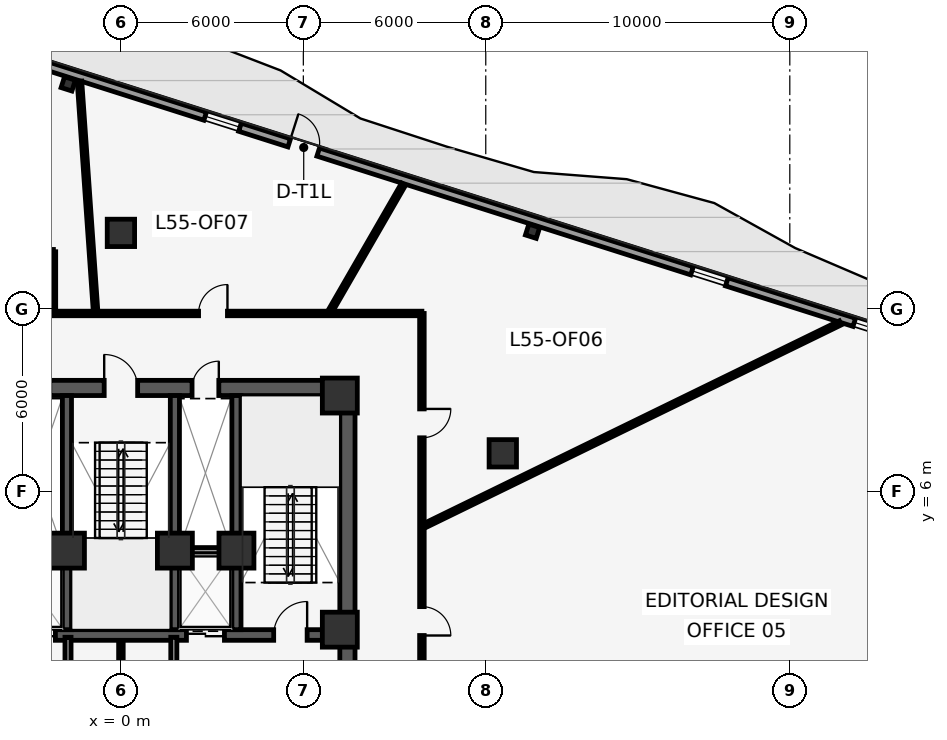
"""IFC4 building model, lengths in metres.
Left out: names, types, materials, properties, quantities, classifications, styles, units other than length and angle.
Written with IfcOpenShell. Run it as: python <this file> out.ifc"""

import sys

from ifc_helpers import new_model, si_unit, direction, frame, frame_2d, origin, origin_2d, place, context, subcontext, project, spatial, rectangle, i_section, extrude, element, fill, save


model = new_model("IFC4")
c1 = context("Model", 3, precision=1e-05, world=origin(), true_north=direction((0.0, 1.0)))
c2 = subcontext(c1, "Body", "Model", "MODEL_VIEW")
j1 = project(units=[si_unit("LENGTHUNIT", "METRE"), si_unit("PLANEANGLEUNIT", "RADIAN")], contexts=[c1])
p1 = place(None, origin())
s1 = spatial("IfcSite", under=j1, at=p1, CompositionType="ELEMENT")
p2 = place(p1, origin())
s2 = spatial("IfcBuilding", under=s1, at=p2, CompositionType="ELEMENT")
p3 = place(p2, frame((0.0, 0.0, 236.3)))
s3 = spatial("IfcBuildingStorey", under=s2, at=p3, CompositionType="ELEMENT", Elevation=236.3)
p4 = place(p3, frame((-7.45, 9.4, 0.0), z_axis=(0.0, 0.0, 1.0), x_axis=(1.0, 0.0, 0.0)))
e1 = element("IfcWall", 1, at=p4, inside=s3, PredefinedType="SHEAR", context=c2, shape_type="SweptSolid", body=[
    extrude(rectangle(XDim=14.9, YDim=0.5, at=frame_2d((7.45, 0.0))), origin(), (0.0, 0.0, 1.0), 3.85),
])
p5 = place(p4, frame((6.9, 0.0, 0.0)))
e2 = element("IfcOpeningElement", 2, at=p5, cuts=e1, PredefinedType="OPENING", context=c2, shape_type="SweptSolid", body=[
    extrude(rectangle(XDim=1.1, YDim=2.15, at=frame_2d((0.55, 1.075))), frame((0.0, 0.26, 0.0), z_axis=(0.0, -1.0, 0.0), x_axis=(1.0, 0.0, 0.0)), (0.0, 0.0, 1.0), 0.52),
])
p6 = place(p4, frame((4.23, 0.0, 0.0)))
e3 = element("IfcOpeningElement", 3, at=p6, cuts=e1, PredefinedType="OPENING", context=c2, shape_type="SweptSolid", body=[
    extrude(rectangle(XDim=0.88, YDim=2.15, at=frame_2d((0.44, 1.075))), frame((0.0, 0.26, 0.0), z_axis=(0.0, -1.0, 0.0), x_axis=(1.0, 0.0, 0.0)), (0.0, 0.0, 1.0), 0.52),
])
p7 = place(p4, frame((9.79, 0.0, 0.0)))
e4 = element("IfcOpeningElement", 4, at=p7, cuts=e1, PredefinedType="OPENING", context=c2, shape_type="SweptSolid", body=[
    extrude(rectangle(XDim=0.88, YDim=2.15, at=frame_2d((0.44, 1.075))), frame((0.0, 0.26, 0.0), z_axis=(0.0, -1.0, 0.0), x_axis=(1.0, 0.0, 0.0)), (0.0, 0.0, 1.0), 0.52),
])
p8 = place(p3, frame((-7.2, 1.275, 0.0), z_axis=(0.0, 0.0, 1.0), x_axis=(1.0, 0.0, 0.0)))
e5 = element("IfcWall", 5, at=p8, inside=s3, PredefinedType="SHEAR", context=c2, shape_type="SweptSolid", body=[
    extrude(rectangle(XDim=14.4, YDim=0.35, at=frame_2d((7.2, 0.0))), origin(), (0.0, 0.0, 1.0), 3.85),
])
p9 = place(p8, frame((3.795, 0.0, 0.0)))
e6 = element("IfcOpeningElement", 6, at=p9, cuts=e5, PredefinedType="OPENING", context=c2, shape_type="SweptSolid", body=[
    extrude(rectangle(XDim=1.25, YDim=2.25, at=frame_2d((0.625, 1.125))), frame((0.0, 0.185, 0.0), z_axis=(0.0, -1.0, 0.0), x_axis=(1.0, 0.0, 0.0)), (0.0, 0.0, 1.0), 0.37),
])
p10 = place(p8, frame((9.355, 0.0, 0.0)))
e7 = element("IfcOpeningElement", 7, at=p10, cuts=e5, PredefinedType="OPENING", context=c2, shape_type="SweptSolid", body=[
    extrude(rectangle(XDim=1.25, YDim=2.25, at=frame_2d((0.625, 1.125))), frame((0.0, 0.185, 0.0), z_axis=(0.0, -1.0, 0.0), x_axis=(1.0, 0.0, 0.0)), (0.0, 0.0, 1.0), 0.37),
])
p11 = place(p8, frame((1.075, 0.0, 0.0)))
e8 = element("IfcOpeningElement", 8, at=p11, cuts=e5, PredefinedType="OPENING", context=c2, shape_type="SweptSolid", body=[
    extrude(rectangle(XDim=1.1, YDim=2.15, at=frame_2d((0.55, 1.075))), frame((0.0, 0.185, 0.0), z_axis=(0.0, -1.0, 0.0), x_axis=(1.0, 0.0, 0.0)), (0.0, 0.0, 1.0), 0.37),
])
p12 = place(p8, frame((12.225, 0.0, 0.0)))
e9 = element("IfcOpeningElement", 9, at=p12, cuts=e5, PredefinedType="OPENING", context=c2, shape_type="SweptSolid", body=[
    extrude(rectangle(XDim=1.1, YDim=2.15, at=frame_2d((0.55, 1.075))), frame((0.0, 0.185, 0.0), z_axis=(0.0, -1.0, 0.0), x_axis=(1.0, 0.0, 0.0)), (0.0, 0.0, 1.0), 0.37),
])
for number, where, z_axis, x_axis in (
    (10, (-1.775, 1.45, 0.0), (0.0, 0.0, 1.0), (0.0, 1.0, 0.0)),
    (11, (1.775, 1.45, 0.0), (0.0, 0.0, 1.0), (0.0, 1.0, 0.0)),
    (12, (3.8, 1.45, 0.0), (0.0, 0.0, 1.0), (0.0, 1.0, 0.0)),
):
    element("IfcWall", number, at=place(p3, frame(where, z_axis=z_axis, x_axis=x_axis)), inside=s3, PredefinedType="SHEAR", context=c2, shape_type="SweptSolid", body=[
        extrude(rectangle(XDim=7.7, YDim=0.3, at=frame_2d((3.85, 0.0))), origin(), (0.0, 0.0, 1.0), 3.85),
    ])
p13 = place(p3, frame((7.45, 0.1, 0.0), z_axis=(0.0, 0.0, 1.0), x_axis=(0.0, 1.0, 0.0)))
e13 = element("IfcWall", 13, at=p13, inside=s3, PredefinedType="SHEAR", context=c2, shape_type="SweptSolid", body=[
    extrude(rectangle(XDim=9.05, YDim=0.5, at=frame_2d((4.525, 0.0))), origin(), (0.0, 0.0, 1.0), 3.85),
])
for number, where, z_axis, x_axis in (
    (14, (7.2, 1.45, 0.0), (0.0, 0.0, 1.0), (1.0, 0.0, 0.0)),
    (15, (7.2, 9.15, 0.0), (0.0, 0.0, 1.0), (1.0, 0.0, 0.0)),
    (16, (3.8, 4.05, 0.0), (0.0, 0.0, 1.0), (1.0, 0.0, 0.0)),
    (17, (-1.775, 4.05, 0.0), (0.0, 0.0, 1.0), (1.0, 0.0, 0.0)),
    (18, (1.775, 4.05, 0.0), (0.0, 0.0, 1.0), (1.0, 0.0, 0.0)),
):
    element("IfcColumn", number, at=place(p3, frame(where, z_axis=z_axis, x_axis=x_axis)), inside=s3, PredefinedType="COLUMN", context=c2, shape_type="SweptSolid", body=[
        extrude(rectangle(XDim=1.15, YDim=1.15, at=origin_2d()), origin(), (0.0, 0.0, 1.0), 4.1),
    ])
for number, where, z_axis, x_axis in (
    (19, (12.56, 7.25, 0.0), (0.0, 0.0, 1.0), (1.0, 0.0, 0.0)),
    (20, (0.0, 14.5, 0.0), (0.0, 0.0, 1.0), (1.0, 0.0, 0.0)),
):
    element("IfcColumn", number, at=place(p3, frame(where, z_axis=z_axis, x_axis=x_axis)), inside=s3, PredefinedType="COLUMN", context=c2, shape_type="SweptSolid", body=[
        extrude(rectangle(XDim=0.9, YDim=0.9, at=origin_2d()), origin(), (0.0, 0.0, 1.0), 4.1),
    ])
for number, where, z_axis, x_axis in (
    (21, (13.539, 14.553, 0.0), (0.0, 0.0, 1.0), (-0.953, 0.303, 0.0)),
    (22, (-1.733, 19.4, 0.0), (0.0, 0.0, 1.0), (-0.953, 0.303, 0.0)),
):
    element("IfcColumn", number, at=place(p3, frame(where, z_axis=z_axis, x_axis=x_axis)), inside=s3, PredefinedType="COLUMN", context=c2, shape_type="SweptSolid", body=[
        extrude(i_section(OverallWidth=0.373, OverallDepth=0.373, WebThickness=0.016, FlangeThickness=0.026, at=origin_2d()), origin(), (0.0, 0.0, 1.0), 4.1),
    ])
p14 = place(p3, frame((-17.407, 24.748, 0.0), z_axis=(0.0, 0.0, 1.0), x_axis=(0.953082756031, -0.302709861346, 0.0)))
e23 = element("IfcWall", 23, at=p14, inside=s3, PredefinedType="STANDARD", context=c2, shape_type="SweptSolid", body=[
    extrude(rectangle(XDim=49.145, YDim=0.28, at=frame_2d((24.573, 0.0))), origin(), (0.0, 0.0, 1.0), 3.85),
])
p15 = place(p14, frame((24.073, 0.0, 0.0)))
e24 = element("IfcOpeningElement", 24, at=p15, cuts=e23, PredefinedType="OPENING", context=c2, shape_type="SweptSolid", body=[
    extrude(rectangle(XDim=1.0, YDim=2.15, at=frame_2d((0.5, 1.075))), frame((0.0, 0.15, 0.0), z_axis=(0.0, -1.0, 0.0), x_axis=(1.0, 0.0, 0.0)), (0.0, 0.0, 1.0), 0.3),
])
p16 = place(p14, frame((4.373, 0.0, 0.85)))
e25 = element("IfcOpeningElement", 25, at=p16, cuts=e23, PredefinedType="OPENING", context=c2, shape_type="SweptSolid", body=[
    extrude(rectangle(XDim=1.2, YDim=2.2, at=frame_2d((0.6, 1.1))), frame((0.0, 0.15, 0.0), z_axis=(0.0, -1.0, 0.0), x_axis=(1.0, 0.0, 0.0)), (0.0, 0.0, 1.0), 0.3),
])
p17 = place(p14, frame((9.973, 0.0, 0.85)))
e26 = element("IfcOpeningElement", 26, at=p17, cuts=e23, PredefinedType="OPENING", context=c2, shape_type="SweptSolid", body=[
    extrude(rectangle(XDim=1.2, YDim=2.2, at=frame_2d((0.6, 1.1))), frame((0.0, 0.15, 0.0), z_axis=(0.0, -1.0, 0.0), x_axis=(1.0, 0.0, 0.0)), (0.0, 0.0, 1.0), 0.3),
])
p18 = place(p14, frame((21.173, 0.0, 0.85)))
e27 = element("IfcOpeningElement", 27, at=p18, cuts=e23, PredefinedType="OPENING", context=c2, shape_type="SweptSolid", body=[
    extrude(rectangle(XDim=1.2, YDim=2.2, at=frame_2d((0.6, 1.1))), frame((0.0, 0.15, 0.0), z_axis=(0.0, -1.0, 0.0), x_axis=(1.0, 0.0, 0.0)), (0.0, 0.0, 1.0), 0.3),
])
p19 = place(p14, frame((37.973, 0.0, 0.85)))
e28 = element("IfcOpeningElement", 28, at=p19, cuts=e23, PredefinedType="OPENING", context=c2, shape_type="SweptSolid", body=[
    extrude(rectangle(XDim=1.2, YDim=2.2, at=frame_2d((0.6, 1.1))), frame((0.0, 0.15, 0.0), z_axis=(0.0, -1.0, 0.0), x_axis=(1.0, 0.0, 0.0)), (0.0, 0.0, 1.0), 0.3),
])
p20 = place(p14, frame((43.573, 0.0, 0.85)))
e29 = element("IfcOpeningElement", 29, at=p20, cuts=e23, PredefinedType="OPENING", context=c2, shape_type="SweptSolid", body=[
    extrude(rectangle(XDim=1.2, YDim=2.2, at=frame_2d((0.6, 1.1))), frame((0.0, 0.15, 0.0), z_axis=(0.0, -1.0, 0.0), x_axis=(1.0, 0.0, 0.0)), (0.0, 0.0, 1.0), 0.3),
])
p21 = place(p3, frame((30.935, 2.916, 0.0), z_axis=(0.0, 0.0, 1.0), x_axis=(-0.743143233829, -0.66913237406, 0.0)))
e30 = element("IfcWall", 30, at=p21, inside=s3, PredefinedType="STANDARD", context=c2, shape_type="SweptSolid", body=[
    extrude(rectangle(XDim=49.88, YDim=0.28, at=frame_2d((24.94, 0.0))), origin(), (0.0, 0.0, 1.0), 3.85),
])
p22 = place(p21, frame((24.44, 0.0, 0.0)))
e31 = element("IfcOpeningElement", 31, at=p22, cuts=e30, PredefinedType="OPENING", context=c2, shape_type="SweptSolid", body=[
    extrude(rectangle(XDim=1.0, YDim=2.15, at=frame_2d((0.5, 1.075))), frame((0.0, 0.15, 0.0), z_axis=(0.0, -1.0, 0.0), x_axis=(1.0, 0.0, 0.0)), (0.0, 0.0, 1.0), 0.3),
])
p23 = place(p21, frame((4.74, 0.0, 0.85)))
e32 = element("IfcOpeningElement", 32, at=p23, cuts=e30, PredefinedType="OPENING", context=c2, shape_type="SweptSolid", body=[
    extrude(rectangle(XDim=1.2, YDim=2.2, at=frame_2d((0.6, 1.1))), frame((0.0, 0.15, 0.0), z_axis=(0.0, -1.0, 0.0), x_axis=(1.0, 0.0, 0.0)), (0.0, 0.0, 1.0), 0.3),
])
p24 = place(p21, frame((10.34, 0.0, 0.85)))
e33 = element("IfcOpeningElement", 33, at=p24, cuts=e30, PredefinedType="OPENING", context=c2, shape_type="SweptSolid", body=[
    extrude(rectangle(XDim=1.2, YDim=2.2, at=frame_2d((0.6, 1.1))), frame((0.0, 0.15, 0.0), z_axis=(0.0, -1.0, 0.0), x_axis=(1.0, 0.0, 0.0)), (0.0, 0.0, 1.0), 0.3),
])
p25 = place(p21, frame((27.14, 0.0, 0.85)))
e34 = element("IfcOpeningElement", 34, at=p25, cuts=e30, PredefinedType="OPENING", context=c2, shape_type="SweptSolid", body=[
    extrude(rectangle(XDim=1.2, YDim=2.2, at=frame_2d((0.6, 1.1))), frame((0.0, 0.15, 0.0), z_axis=(0.0, -1.0, 0.0), x_axis=(1.0, 0.0, 0.0)), (0.0, 0.0, 1.0), 0.3),
])
p26 = place(p21, frame((38.34, 0.0, 0.85)))
e35 = element("IfcOpeningElement", 35, at=p26, cuts=e30, PredefinedType="OPENING", context=c2, shape_type="SweptSolid", body=[
    extrude(rectangle(XDim=1.2, YDim=2.2, at=frame_2d((0.6, 1.1))), frame((0.0, 0.15, 0.0), z_axis=(0.0, -1.0, 0.0), x_axis=(1.0, 0.0, 0.0)), (0.0, 0.0, 1.0), 0.3),
])
p27 = place(p21, frame((43.94, 0.0, 0.85)))
e36 = element("IfcOpeningElement", 36, at=p27, cuts=e30, PredefinedType="OPENING", context=c2, shape_type="SweptSolid", body=[
    extrude(rectangle(XDim=1.2, YDim=2.2, at=frame_2d((0.6, 1.1))), frame((0.0, 0.15, 0.0), z_axis=(0.0, -1.0, 0.0), x_axis=(1.0, 0.0, 0.0)), (0.0, 0.0, 1.0), 0.3),
])
for number, where, z_axis, x_axis in (
    (37, (-3.65, 4.05, 0.0), (0.0, 0.0, 1.0), (1.0, 0.0, 0.0)),
    (38, (1.92, 4.05, 0.0), (0.0, 0.0, 1.0), (1.0, 0.0, 0.0)),
):
    element("IfcWall", number, at=place(p3, frame(where, z_axis=z_axis, x_axis=x_axis)), inside=s3, PredefinedType="PARTITIONING", context=c2, shape_type="SweptSolid", body=[
        extrude(rectangle(XDim=1.73, YDim=0.2, at=frame_2d((0.865, 0.0))), origin(), (0.0, 0.0, 1.0), 3.85),
    ])
p28 = place(p3, frame((-1.74, -1.78, 0.0), z_axis=(0.0, 0.0, 1.0), x_axis=(0.0, 1.0, 0.0)))
e39 = element("IfcWall", 39, at=p28, inside=s3, PredefinedType="PARTITIONING", context=c2, shape_type="SweptSolid", body=[
    extrude(rectangle(XDim=2.98, YDim=0.2, at=frame_2d((1.49, 0.0))), origin(), (0.0, 0.0, 1.0), 3.85),
])
p29 = place(p28, frame((0.89, 0.0, 0.0)))
e40 = element("IfcOpeningElement", 40, at=p29, cuts=e39, PredefinedType="OPENING", context=c2, shape_type="SweptSolid", body=[
    extrude(rectangle(XDim=0.88, YDim=2.15, at=frame_2d((0.44, 1.075))), frame((0.0, 0.11, 0.0), z_axis=(0.0, -1.0, 0.0), x_axis=(1.0, 0.0, 0.0)), (0.0, 0.0, 1.0), 0.22),
])
p30 = place(p3, frame((1.74, -1.78, 0.0), z_axis=(0.0, 0.0, 1.0), x_axis=(0.0, 1.0, 0.0)))
e41 = element("IfcWall", 41, at=p30, inside=s3, PredefinedType="PARTITIONING", context=c2, shape_type="SweptSolid", body=[
    extrude(rectangle(XDim=2.98, YDim=0.2, at=frame_2d((1.49, 0.0))), origin(), (0.0, 0.0, 1.0), 3.85),
])
p31 = place(p30, frame((0.89, 0.0, 0.0)))
e42 = element("IfcOpeningElement", 42, at=p31, cuts=e41, PredefinedType="OPENING", context=c2, shape_type="SweptSolid", body=[
    extrude(rectangle(XDim=0.88, YDim=2.15, at=frame_2d((0.44, 1.075))), frame((0.0, 0.11, 0.0), z_axis=(0.0, -1.0, 0.0), x_axis=(1.0, 0.0, 0.0)), (0.0, 0.0, 1.0), 0.22),
])
p32 = place(p3, frame((0.0, -1.78, 0.0), z_axis=(0.0, 0.0, 1.0), x_axis=(0.0, 1.0, 0.0)))
e43 = element("IfcWall", 43, at=p32, inside=s3, PredefinedType="PARTITIONING", context=c2, shape_type="SweptSolid", body=[
    extrude(rectangle(XDim=2.83, YDim=0.15, at=frame_2d((1.415, 0.0))), origin(), (0.0, 0.0, 1.0), 3.85),
])
p33 = place(p3, frame((-4.53, 13.88, 0.0), z_axis=(0.0, 0.0, 1.0), x_axis=(1.0, 0.0, 0.0)))
e44 = element("IfcWall", 44, at=p33, inside=s3, PredefinedType="PARTITIONING", context=c2, shape_type="SweptSolid", body=[
    extrude(rectangle(XDim=2.31, YDim=0.15, at=frame_2d((1.155, 0.0))), origin(), (0.0, 0.0, 1.0), 3.85),
])
p34 = place(p3, frame((-2.22, 13.88, 0.0), z_axis=(0.0, 0.0, 1.0), x_axis=(0.0, -1.0, 0.0)))
e45 = element("IfcWall", 45, at=p34, inside=s3, PredefinedType="PARTITIONING", context=c2, shape_type="SweptSolid", body=[
    extrude(rectangle(XDim=2.03, YDim=0.15, at=frame_2d((1.015, 0.0))), origin(), (0.0, 0.0, 1.0), 3.85),
])
p35 = place(p3, frame((-2.22, 11.85, 0.0), z_axis=(0.0, 0.0, 1.0), x_axis=(1.0, 0.0, 0.0)))
e46 = element("IfcWall", 46, at=p35, inside=s3, PredefinedType="PARTITIONING", context=c2, shape_type="SweptSolid", body=[
    extrude(rectangle(XDim=12.12, YDim=0.15, at=frame_2d((6.06, 0.0))), origin(), (0.0, 0.0, 1.0), 3.85),
])
p36 = place(p35, frame((4.774, 0.0, 0.0)))
e47 = element("IfcOpeningElement", 47, at=p36, cuts=e46, PredefinedType="OPENING", context=c2, shape_type="SweptSolid", body=[
    extrude(rectangle(XDim=0.95, YDim=2.15, at=frame_2d((0.475, 1.075))), frame((0.0, 0.085, 0.0), z_axis=(0.0, -1.0, 0.0), x_axis=(1.0, 0.0, 0.0)), (0.0, 0.0, 1.0), 0.17),
])
p37 = place(p3, frame((9.9, 11.85, 0.0), z_axis=(0.0, 0.0, 1.0), x_axis=(0.0, -1.0, 0.0)))
e48 = element("IfcWall", 48, at=p37, inside=s3, PredefinedType="PARTITIONING", context=c2, shape_type="SweptSolid", body=[
    extrude(rectangle(XDim=23.55, YDim=0.15, at=frame_2d((11.775, 0.0))), origin(), (0.0, 0.0, 1.0), 3.85),
])
p38 = place(p37, frame((16.585, 0.0, 0.0)))
e49 = element("IfcOpeningElement", 49, at=p38, cuts=e48, PredefinedType="OPENING", context=c2, shape_type="SweptSolid", body=[
    extrude(rectangle(XDim=0.95, YDim=2.15, at=frame_2d((0.475, 1.075))), frame((0.0, 0.085, 0.0), z_axis=(0.0, -1.0, 0.0), x_axis=(1.0, 0.0, 0.0)), (0.0, 0.0, 1.0), 0.17),
])
p39 = place(p37, frame((9.642, 0.0, 0.0)))
e50 = element("IfcOpeningElement", 50, at=p39, cuts=e48, PredefinedType="OPENING", context=c2, shape_type="SweptSolid", body=[
    extrude(rectangle(XDim=0.95, YDim=2.15, at=frame_2d((0.475, 1.075))), frame((0.0, 0.085, 0.0), z_axis=(0.0, -1.0, 0.0), x_axis=(1.0, 0.0, 0.0)), (0.0, 0.0, 1.0), 0.17),
])
p40 = place(p37, frame((3.14, 0.0, 0.0)))
e51 = element("IfcOpeningElement", 51, at=p40, cuts=e48, PredefinedType="OPENING", context=c2, shape_type="SweptSolid", body=[
    extrude(rectangle(XDim=0.95, YDim=2.15, at=frame_2d((0.475, 1.075))), frame((0.0, 0.085, 0.0), z_axis=(0.0, -1.0, 0.0), x_axis=(1.0, 0.0, 0.0)), (0.0, 0.0, 1.0), 0.17),
])
p41 = place(p3, frame((10.005, 4.88, 0.0), z_axis=(0.0, 0.0, 1.0), x_axis=(0.89879886383, 0.43836126925, 0.0)))
e52 = element("IfcWall", 52, at=p41, inside=s3, PredefinedType="PARTITIONING", context=c2, shape_type="SweptSolid", body=[
    extrude(rectangle(XDim=15.195, YDim=0.15, at=frame_2d((7.598, 0.0))), origin(), (0.0, 0.0, 1.0), 3.85),
])
p42 = place(p3, frame((6.902, 11.955, 0.0), z_axis=(0.0, 0.0, 1.0), x_axis=(0.500009234706, 0.866020072059, 0.0)))
e53 = element("IfcWall", 53, at=p42, inside=s3, PredefinedType="PARTITIONING", context=c2, shape_type="SweptSolid", body=[
    extrude(rectangle(XDim=4.79, YDim=0.15, at=frame_2d((2.395, 0.0))), origin(), (0.0, 0.0, 1.0), 3.85),
])
p43 = place(p3, frame((-0.836, 11.955, 0.0), z_axis=(0.0, 0.0, 1.0), x_axis=(-0.069760607816, 0.997563761169, 0.0)))
e54 = element("IfcWall", 54, at=p43, inside=s3, PredefinedType="PARTITIONING", context=c2, shape_type="SweptSolid", body=[
    extrude(rectangle(XDim=7.552, YDim=0.15, at=frame_2d((3.776, 0.0))), origin(), (0.0, 0.0, 1.0), 3.85),
])
p44 = place(p15, origin())
e55 = element("IfcDoor", 55, at=p44, inside=s3, OperationType="SINGLE_SWING_LEFT", PredefinedType="DOOR", context=c2, shape_type="SweptSolid", body=[
    extrude(rectangle(XDim=1.0, YDim=2.15, at=frame_2d((0.5, 1.075))), frame((0.0, 0.025, 0.0), z_axis=(0.0, -1.0, 0.0), x_axis=(1.0, 0.0, 0.0)), (0.0, 0.0, 1.0), 0.05),
])
fill(e24, e55)
p45 = place(p18, origin())
e56 = element("IfcWindow", 56, at=p45, inside=s3, PartitioningType="SINGLE_PANEL", PredefinedType="WINDOW", context=c2, shape_type="SweptSolid", body=[
    extrude(rectangle(XDim=1.2, YDim=2.2, at=frame_2d((0.6, 1.1))), frame((0.0, 0.03, 0.0), z_axis=(0.0, -1.0, 0.0), x_axis=(1.0, 0.0, 0.0)), (0.0, 0.0, 1.0), 0.06),
])
fill(e27, e56)
p46 = place(p19, origin())
e57 = element("IfcWindow", 57, at=p46, inside=s3, PartitioningType="SINGLE_PANEL", PredefinedType="WINDOW", context=c2, shape_type="SweptSolid", body=[
    extrude(rectangle(XDim=1.2, YDim=2.2, at=frame_2d((0.6, 1.1))), frame((0.0, 0.03, 0.0), z_axis=(0.0, -1.0, 0.0), x_axis=(1.0, 0.0, 0.0)), (0.0, 0.0, 1.0), 0.06),
])
fill(e28, e57)
p47 = place(p20, origin())
e58 = element("IfcWindow", 58, at=p47, inside=s3, PartitioningType="SINGLE_PANEL", PredefinedType="WINDOW", context=c2, shape_type="SweptSolid", body=[
    extrude(rectangle(XDim=1.2, YDim=2.2, at=frame_2d((0.6, 1.1))), frame((0.0, 0.03, 0.0), z_axis=(0.0, -1.0, 0.0), x_axis=(1.0, 0.0, 0.0)), (0.0, 0.0, 1.0), 0.06),
])
fill(e29, e58)
p48 = place(p9, origin())
e59 = element("IfcDoor", 59, at=p48, inside=s3, OperationType="DOUBLE_DOOR_SLIDING", PredefinedType="DOOR", context=c2, shape_type="SweptSolid", body=[
    extrude(rectangle(XDim=1.25, YDim=2.25, at=frame_2d((0.625, 1.125))), frame((0.0, 0.025, 0.0), z_axis=(0.0, -1.0, 0.0), x_axis=(1.0, 0.0, 0.0)), (0.0, 0.0, 1.0), 0.05),
])
fill(e6, e59)
p49 = place(p10, origin())
e60 = element("IfcDoor", 60, at=p49, inside=s3, OperationType="DOUBLE_DOOR_SLIDING", PredefinedType="DOOR", context=c2, shape_type="SweptSolid", body=[
    extrude(rectangle(XDim=1.25, YDim=2.25, at=frame_2d((0.625, 1.125))), frame((0.0, 0.025, 0.0), z_axis=(0.0, -1.0, 0.0), x_axis=(1.0, 0.0, 0.0)), (0.0, 0.0, 1.0), 0.05),
])
fill(e7, e60)
p50 = place(p12, origin())
e61 = element("IfcDoor", 61, at=p50, inside=s3, OperationType="SINGLE_SWING_RIGHT", PredefinedType="DOOR", context=c2, shape_type="SweptSolid", body=[
    extrude(rectangle(XDim=1.1, YDim=2.15, at=frame_2d((0.55, 1.075))), frame((0.0, 0.025, 0.0), z_axis=(0.0, -1.0, 0.0), x_axis=(1.0, 0.0, 0.0)), (0.0, 0.0, 1.0), 0.05),
])
fill(e9, e61)
p51 = place(p5, origin())
e62 = element("IfcDoor", 62, at=p51, inside=s3, OperationType="SINGLE_SWING_LEFT", PredefinedType="DOOR", context=c2, shape_type="SweptSolid", body=[
    extrude(rectangle(XDim=1.1, YDim=2.15, at=frame_2d((0.55, 1.075))), frame((0.0, 0.025, 0.0), z_axis=(0.0, -1.0, 0.0), x_axis=(1.0, 0.0, 0.0)), (0.0, 0.0, 1.0), 0.05),
])
fill(e2, e62)
p52 = place(p7, origin())
e63 = element("IfcDoor", 63, at=p52, inside=s3, OperationType="SINGLE_SWING_RIGHT", PredefinedType="DOOR", context=c2, shape_type="SweptSolid", body=[
    extrude(rectangle(XDim=0.88, YDim=2.15, at=frame_2d((0.44, 1.075))), frame((0.0, 0.025, 0.0), z_axis=(0.0, -1.0, 0.0), x_axis=(1.0, 0.0, 0.0)), (0.0, 0.0, 1.0), 0.05),
])
fill(e4, e63)
p53 = place(p39, origin())
e64 = element("IfcDoor", 64, at=p53, inside=s3, OperationType="SINGLE_SWING_RIGHT", PredefinedType="DOOR", context=c2, shape_type="SweptSolid", body=[
    extrude(rectangle(XDim=0.95, YDim=2.15, at=frame_2d((0.475, 1.075))), frame((0.0, 0.025, 0.0), z_axis=(0.0, -1.0, 0.0), x_axis=(1.0, 0.0, 0.0)), (0.0, 0.0, 1.0), 0.05),
])
fill(e50, e64)
p54 = place(p40, origin())
e65 = element("IfcDoor", 65, at=p54, inside=s3, OperationType="SINGLE_SWING_LEFT", PredefinedType="DOOR", context=c2, shape_type="SweptSolid", body=[
    extrude(rectangle(XDim=0.95, YDim=2.15, at=frame_2d((0.475, 1.075))), frame((0.0, 0.025, 0.0), z_axis=(0.0, -1.0, 0.0), x_axis=(1.0, 0.0, 0.0)), (0.0, 0.0, 1.0), 0.05),
])
fill(e51, e65)
p55 = place(p36, origin())
e66 = element("IfcDoor", 66, at=p55, inside=s3, OperationType="SINGLE_SWING_RIGHT", PredefinedType="DOOR", context=c2, shape_type="SweptSolid", body=[
    extrude(rectangle(XDim=0.95, YDim=2.15, at=frame_2d((0.475, 1.075))), frame((0.0, 0.025, 0.0), z_axis=(0.0, -1.0, 0.0), x_axis=(1.0, 0.0, 0.0)), (0.0, 0.0, 1.0), 0.05),
])
fill(e47, e66)
save(model, sys.argv[1])
